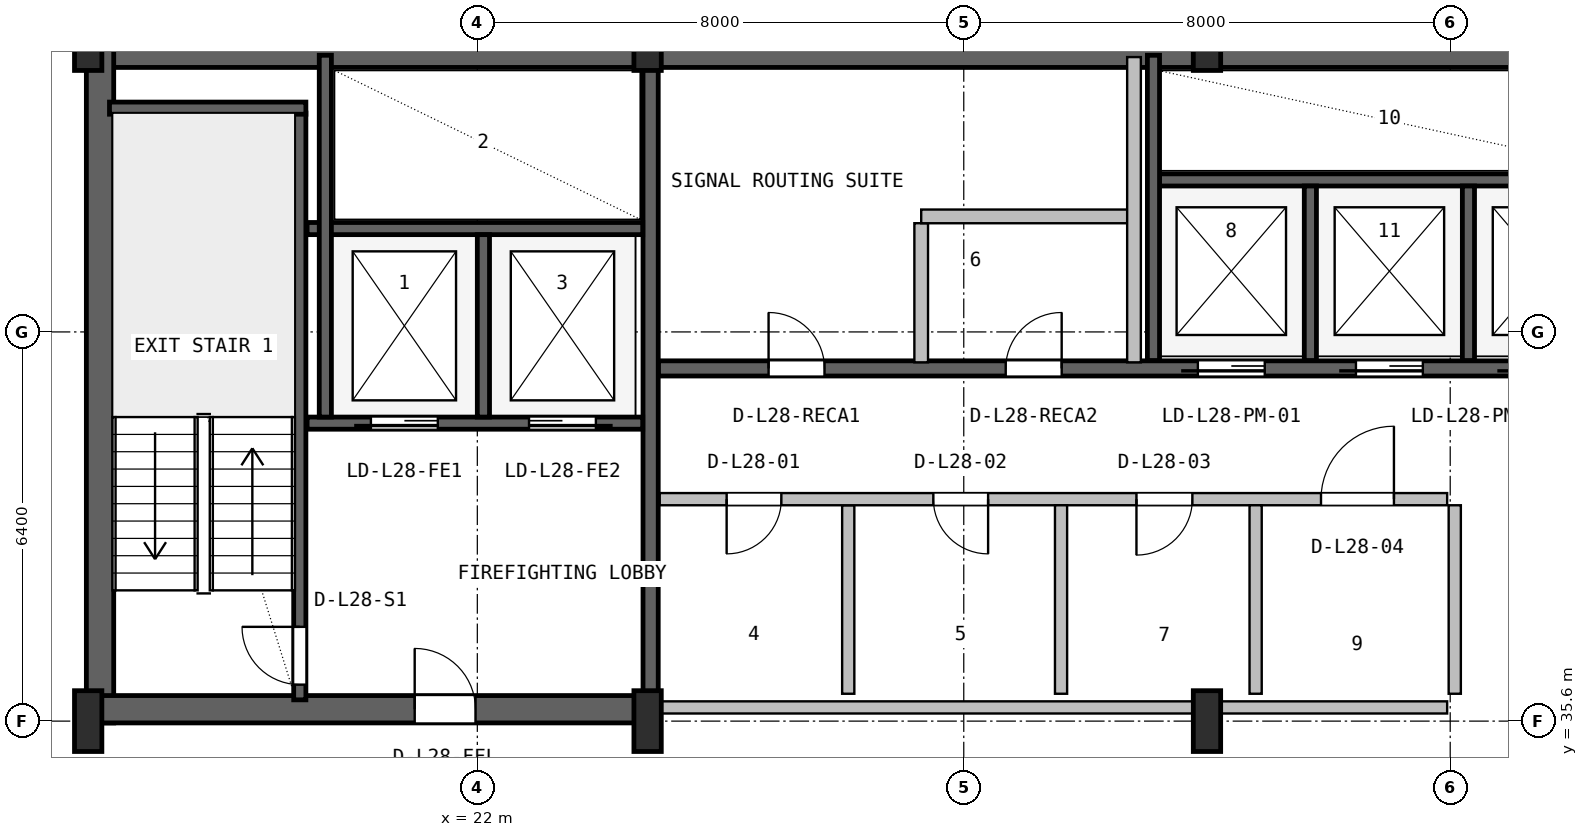
"""IFC4 building model, lengths in metres.
Left out: names, types, materials, properties, quantities, classifications, styles, units other than length and angle.
Written with IfcOpenShell. Run it as: python <this file> out.ifc"""

import sys

from ifc_helpers import new_model, si_unit, direction, frame, frame_2d, origin, origin_2d, place, context, subcontext, project, spatial, rectangle, i_section, extrude, source, transform, mapped, element, fill, save


model = new_model("IFC4")
c1 = context("Model", 3, precision=1e-05, world=origin(), true_north=direction((0.0, 1.0)))
c2 = subcontext(c1, "Body", "Model", "MODEL_VIEW")
j1 = project(units=[si_unit("LENGTHUNIT", "METRE"), si_unit("PLANEANGLEUNIT", "RADIAN")], contexts=[c1])
p1 = place(None, origin())
s1 = spatial("IfcSite", under=j1, at=p1, CompositionType="ELEMENT")
p2 = place(p1, origin())
s2 = spatial("IfcBuilding", under=s1, at=p2, CompositionType="ELEMENT")
p3 = place(p2, frame((0.0, 0.0, 118.2)))
s3 = spatial("IfcBuildingStorey", under=s2, at=p3, CompositionType="ELEMENT", Elevation=118.2)
p4 = place(p3, frame((15.6, 46.575, 0.0), z_axis=(0.0, 0.0, 1.0), x_axis=(1.0, 0.0, 0.0)))
e1 = element("IfcWall", 1, at=p4, inside=s3, PredefinedType="SHEAR", context=c2, shape_type="SweptSolid", body=[
    extrude(rectangle(XDim=36.8, YDim=0.45, at=frame_2d((18.4, 0.0))), origin(), (0.0, 0.0, 1.0), 3.55),
])
p5 = place(p3, frame((15.795, 35.57, 0.0), z_axis=(0.0, 0.0, 1.0), x_axis=(0.0, 1.0, 0.0)))
e2 = element("IfcWall", 2, at=p5, inside=s3, PredefinedType="SHEAR", context=c2, shape_type="SweptSolid", body=[
    extrude(rectangle(XDim=11.23, YDim=0.45, at=frame_2d((5.615, 0.0))), origin(), (0.0, 0.0, 1.0), 3.55),
])
p6 = place(p3, frame((15.57, 35.795, 0.0), z_axis=(0.0, 0.0, 1.0), x_axis=(1.0, 0.0, 0.0)))
e3 = element("IfcWall", 3, at=p6, inside=s3, PredefinedType="SHEAR", context=c2, shape_type="SweptSolid", body=[
    extrude(rectangle(XDim=9.23, YDim=0.45, at=frame_2d((4.615, 0.0))), origin(), (0.0, 0.0, 1.0), 3.55),
])
p7 = place(p6, frame((5.4, 0.0, 0.0)))
e4 = element("IfcOpeningElement", 4, at=p7, cuts=e3, PredefinedType="OPENING", context=c2, shape_type="SweptSolid", body=[
    extrude(rectangle(XDim=1.0, YDim=2.1, at=frame_2d((0.5, 1.05))), frame((0.0, 0.235, 0.0), z_axis=(0.0, -1.0, 0.0), x_axis=(1.0, 0.0, 0.0)), (0.0, 0.0, 1.0), 0.47),
])
m1 = source(origin(), c2, "Body", "SweptSolid", [
    extrude(i_section(OverallWidth=0.45, OverallDepth=1.0, WebThickness=0.016, FlangeThickness=0.03, FilletRadius=0.016, at=origin_2d()), origin(), (0.0, 0.0, 1.0), 3.8),
])
for number, where, z_axis, x_axis in (
    (5, (15.6, 35.6, 0.0), (0.0, 0.0, 1.0), (1.0, 0.0, 0.0)),
    (6, (15.6, 46.8, 0.0), (0.0, 0.0, 1.0), (1.0, 0.0, 0.0)),
    (7, (24.8, 35.6, 0.0), (0.0, 0.0, 1.0), (1.0, 0.0, 0.0)),
    (8, (24.8, 46.8, 0.0), (0.0, 0.0, 1.0), (1.0, 0.0, 0.0)),
    (9, (34.0, 35.6, 0.0), (0.0, 0.0, 1.0), (1.0, 0.0, 0.0)),
    (10, (34.0, 46.8, 0.0), (0.0, 0.0, 1.0), (1.0, 0.0, 0.0)),
):
    element("IfcColumn", number, at=place(p3, frame(where, z_axis=z_axis, x_axis=x_axis)), inside=s3, PredefinedType="COLUMN", context=c2, shape_type="MappedRepresentation", body=[
        mapped(m1, transform((0.0, 0.0, 0.0), x_axis=(1.0, 0.0, 0.0), y_axis=(0.0, 1.0, 0.0), z_axis=(0.0, 0.0, 1.0), scale=1.0)),
    ])
p8 = place(p3, frame((19.08, 35.95, 0.0), z_axis=(0.0, 0.0, 1.0), x_axis=(0.0, 1.0, 0.0)))
e11 = element("IfcWall", 11, at=p8, inside=s3, PredefinedType="SHEAR", context=c2, shape_type="SweptSolid", body=[
    extrude(rectangle(XDim=9.65, YDim=0.2, at=frame_2d((4.825, 0.0))), origin(), (0.0, 0.0, 1.0), 3.55),
])
p9 = place(p8, frame((0.25, 0.0, 0.0)))
e12 = element("IfcOpeningElement", 12, at=p9, cuts=e11, PredefinedType="OPENING", context=c2, shape_type="SweptSolid", body=[
    extrude(rectangle(XDim=0.95, YDim=2.1, at=frame_2d((0.475, 1.05))), frame((0.0, 0.11, 0.0), z_axis=(0.0, -1.0, 0.0), x_axis=(1.0, 0.0, 0.0)), (0.0, 0.0, 1.0), 0.22),
])
p10 = place(p3, frame((15.95, 45.68, 0.0), z_axis=(0.0, 0.0, 1.0), x_axis=(1.0, 0.0, 0.0)))
e13 = element("IfcWall", 13, at=p10, inside=s3, PredefinedType="SHEAR", context=c2, shape_type="SweptSolid", body=[
    extrude(rectangle(XDim=3.23, YDim=0.2, at=frame_2d((1.615, 0.0))), origin(), (0.0, 0.0, 1.0), 3.55),
])
p11 = place(p3, frame((24.85, 36.05, 0.0), z_axis=(0.0, 0.0, 1.0), x_axis=(0.0, 1.0, 0.0)))
e14 = element("IfcWall", 14, at=p11, inside=s3, PredefinedType="SHEAR", context=c2, shape_type="SweptSolid", body=[
    extrude(rectangle(XDim=10.45, YDim=0.25, at=frame_2d((5.225, 0.0))), origin(), (0.0, 0.0, 1.0), 3.55),
])
p12 = place(p3, frame((19.2, 40.5, 0.0), z_axis=(0.0, 0.0, 1.0), x_axis=(1.0, 0.0, 0.0)))
e15 = element("IfcWall", 15, at=p12, inside=s3, PredefinedType="SHEAR", context=c2, shape_type="SweptSolid", body=[
    extrude(rectangle(XDim=5.52, YDim=0.2, at=frame_2d((2.76, 0.0))), origin(), (0.0, 0.0, 1.0), 3.55),
])
p13 = place(p12, frame((1.05, 0.0, 0.0)))
e16 = element("IfcOpeningElement", 16, at=p13, cuts=e15, PredefinedType="OPENING", context=c2, shape_type="SweptSolid", body=[
    extrude(rectangle(XDim=1.1, YDim=2.18, at=frame_2d((0.55, 1.09))), frame((0.0, 0.11, 0.0), z_axis=(0.0, -1.0, 0.0), x_axis=(1.0, 0.0, 0.0)), (0.0, 0.0, 1.0), 0.22),
])
p14 = place(p12, frame((3.65, 0.0, 0.0)))
e17 = element("IfcOpeningElement", 17, at=p14, cuts=e15, PredefinedType="OPENING", context=c2, shape_type="SweptSolid", body=[
    extrude(rectangle(XDim=1.1, YDim=2.18, at=frame_2d((0.55, 1.09))), frame((0.0, 0.11, 0.0), z_axis=(0.0, -1.0, 0.0), x_axis=(1.0, 0.0, 0.0)), (0.0, 0.0, 1.0), 0.22),
])
p15 = place(p3, frame((19.2, 43.7, 0.0), z_axis=(0.0, 0.0, 1.0), x_axis=(1.0, 0.0, 0.0)))
e18 = element("IfcWall", 18, at=p15, inside=s3, PredefinedType="SHEAR", context=c2, shape_type="SweptSolid", body=[
    extrude(rectangle(XDim=5.52, YDim=0.2, at=frame_2d((2.76, 0.0))), origin(), (0.0, 0.0, 1.0), 3.55),
])
p16 = place(p3, frame((22.1, 40.6, 0.0), z_axis=(0.0, 0.0, 1.0), x_axis=(0.0, 1.0, 0.0)))
e19 = element("IfcWall", 19, at=p16, inside=s3, PredefinedType="SHEAR", context=c2, shape_type="SweptSolid", body=[
    extrude(rectangle(XDim=3.0, YDim=0.2, at=frame_2d((1.5, 0.0))), origin(), (0.0, 0.0, 1.0), 3.55),
])
p17 = place(p3, frame((19.5, 40.6, 0.0), z_axis=(0.0, 0.0, 1.0), x_axis=(0.0, 1.0, 0.0)))
e20 = element("IfcWall", 20, at=p17, inside=s3, PredefinedType="SHEAR", context=c2, shape_type="SweptSolid", body=[
    extrude(rectangle(XDim=5.95, YDim=0.2, at=frame_2d((2.975, 0.0))), origin(), (0.0, 0.0, 1.0), 3.55),
])
p18 = place(p3, frame((24.98, 41.4, 0.0), z_axis=(0.0, 0.0, 1.0), x_axis=(1.0, 0.0, 0.0)))
e21 = element("IfcWall", 21, at=p18, inside=s3, PredefinedType="SHEAR", context=c2, shape_type="SweptSolid", body=[
    extrude(rectangle(XDim=23.82, YDim=0.25, at=frame_2d((11.91, 0.0))), origin(), (0.0, 0.0, 1.0), 3.55),
])
p19 = place(p18, frame((8.87, 0.0, 0.0)))
e22 = element("IfcOpeningElement", 22, at=p19, cuts=e21, PredefinedType="OPENING", context=c2, shape_type="SweptSolid", body=[
    extrude(rectangle(XDim=1.1, YDim=2.18, at=frame_2d((0.55, 1.09))), frame((0.0, 0.135, 0.0), z_axis=(0.0, -1.0, 0.0), x_axis=(1.0, 0.0, 0.0)), (0.0, 0.0, 1.0), 0.27),
])
p20 = place(p18, frame((11.47, 0.0, 0.0)))
e23 = element("IfcOpeningElement", 23, at=p20, cuts=e21, PredefinedType="OPENING", context=c2, shape_type="SweptSolid", body=[
    extrude(rectangle(XDim=1.1, YDim=2.18, at=frame_2d((0.55, 1.09))), frame((0.0, 0.135, 0.0), z_axis=(0.0, -1.0, 0.0), x_axis=(1.0, 0.0, 0.0)), (0.0, 0.0, 1.0), 0.27),
])
p21 = place(p18, frame((14.07, 0.0, 0.0)))
e24 = element("IfcOpeningElement", 24, at=p21, cuts=e21, PredefinedType="OPENING", context=c2, shape_type="SweptSolid", body=[
    extrude(rectangle(XDim=1.1, YDim=2.18, at=frame_2d((0.55, 1.09))), frame((0.0, 0.135, 0.0), z_axis=(0.0, -1.0, 0.0), x_axis=(1.0, 0.0, 0.0)), (0.0, 0.0, 1.0), 0.27),
])
p22 = place(p18, frame((1.81, 0.0, 0.0)))
e25 = element("IfcOpeningElement", 25, at=p22, cuts=e21, PredefinedType="OPENING", context=c2, shape_type="SweptSolid", body=[
    extrude(rectangle(XDim=0.92, YDim=2.08, at=frame_2d((0.46, 1.04))), frame((0.0, 0.135, 0.0), z_axis=(0.0, -1.0, 0.0), x_axis=(1.0, 0.0, 0.0)), (0.0, 0.0, 1.0), 0.27),
])
p23 = place(p18, frame((5.71, 0.0, 0.0)))
e26 = element("IfcOpeningElement", 26, at=p23, cuts=e21, PredefinedType="OPENING", context=c2, shape_type="SweptSolid", body=[
    extrude(rectangle(XDim=0.92, YDim=2.08, at=frame_2d((0.46, 1.04))), frame((0.0, 0.135, 0.0), z_axis=(0.0, -1.0, 0.0), x_axis=(1.0, 0.0, 0.0)), (0.0, 0.0, 1.0), 0.27),
])
p24 = place(p3, frame((33.22, 44.5, 0.0), z_axis=(0.0, 0.0, 1.0), x_axis=(1.0, 0.0, 0.0)))
e27 = element("IfcWall", 27, at=p24, inside=s3, PredefinedType="SHEAR", context=c2, shape_type="SweptSolid", body=[
    extrude(rectangle(XDim=7.63, YDim=0.2, at=frame_2d((3.815, 0.0))), origin(), (0.0, 0.0, 1.0), 3.55),
])
p25 = place(p3, frame((33.12, 41.53, 0.0), z_axis=(0.0, 0.0, 1.0), x_axis=(0.0, 1.0, 0.0)))
e28 = element("IfcWall", 28, at=p25, inside=s3, PredefinedType="SHEAR", context=c2, shape_type="SweptSolid", body=[
    extrude(rectangle(XDim=5.02, YDim=0.2, at=frame_2d((2.51, 0.0))), origin(), (0.0, 0.0, 1.0), 3.55),
])
for number, where, z_axis, x_axis in (
    (29, (35.7, 41.53, 0.0), (0.0, 0.0, 1.0), (0.0, 1.0, 0.0)),
    (30, (38.3, 41.53, 0.0), (0.0, 0.0, 1.0), (0.0, 1.0, 0.0)),
):
    element("IfcWall", number, at=place(p3, frame(where, z_axis=z_axis, x_axis=x_axis)), inside=s3, PredefinedType="SHEAR", context=c2, shape_type="SweptSolid", body=[
        extrude(rectangle(XDim=2.87, YDim=0.2, at=frame_2d((1.435, 0.0))), origin(), (0.0, 0.0, 1.0), 3.55),
    ])
p26 = place(p3, frame((25.0, 35.825, 0.0), z_axis=(0.0, 0.0, 1.0), x_axis=(1.0, 0.0, 0.0)))
e31 = element("IfcWall", 31, at=p26, inside=s3, PredefinedType="SOLIDWALL", context=c2, shape_type="SweptSolid", body=[
    extrude(rectangle(XDim=12.95, YDim=0.2, at=frame_2d((6.475, 0.0))), origin(), (0.0, 0.0, 1.0), 2.325),
])
p27 = place(p3, frame((28.1, 36.05, 0.0), z_axis=(0.0, 0.0, 1.0), x_axis=(0.0, 1.0, 0.0)))
e32 = element("IfcWall", 32, at=p27, inside=s3, PredefinedType="PLUMBINGWALL", context=c2, shape_type="SweptSolid", body=[
    extrude(rectangle(XDim=3.1, YDim=0.2, at=frame_2d((1.55, 0.0))), origin(), (0.0, 0.0, 1.0), 3.53),
])
p28 = place(p3, frame((25.0, 39.25, 0.0), z_axis=(0.0, 0.0, 1.0), x_axis=(1.0, 0.0, 0.0)))
e33 = element("IfcWall", 33, at=p28, inside=s3, PredefinedType="SOLIDWALL", context=c2, shape_type="SweptSolid", body=[
    extrude(rectangle(XDim=12.95, YDim=0.2, at=frame_2d((6.475, 0.0))), origin(), (0.0, 0.0, 1.0), 3.53),
])
p29 = place(p28, frame((1.1, 0.0, 0.0)))
e34 = element("IfcOpeningElement", 34, at=p29, cuts=e33, PredefinedType="OPENING", context=c2, shape_type="SweptSolid", body=[
    extrude(rectangle(XDim=0.9, YDim=2.06, at=frame_2d((0.45, 1.03))), frame((0.0, 0.11, 0.0), z_axis=(0.0, -1.0, 0.0), x_axis=(1.0, 0.0, 0.0)), (0.0, 0.0, 1.0), 0.22),
])
p30 = place(p28, frame((4.5, 0.0, 0.0)))
e35 = element("IfcOpeningElement", 35, at=p30, cuts=e33, PredefinedType="OPENING", context=c2, shape_type="SweptSolid", body=[
    extrude(rectangle(XDim=0.9, YDim=2.06, at=frame_2d((0.45, 1.03))), frame((0.0, 0.11, 0.0), z_axis=(0.0, -1.0, 0.0), x_axis=(1.0, 0.0, 0.0)), (0.0, 0.0, 1.0), 0.22),
])
p31 = place(p28, frame((7.84, 0.0, 0.0)))
e36 = element("IfcOpeningElement", 36, at=p31, cuts=e33, PredefinedType="OPENING", context=c2, shape_type="SweptSolid", body=[
    extrude(rectangle(XDim=0.92, YDim=2.08, at=frame_2d((0.46, 1.04))), frame((0.0, 0.11, 0.0), z_axis=(0.0, -1.0, 0.0), x_axis=(1.0, 0.0, 0.0)), (0.0, 0.0, 1.0), 0.22),
])
p32 = place(p28, frame((10.875, 0.0, 0.0)))
e37 = element("IfcOpeningElement", 37, at=p32, cuts=e33, PredefinedType="OPENING", context=c2, shape_type="SweptSolid", body=[
    extrude(rectangle(XDim=1.2, YDim=2.1, at=frame_2d((0.6, 1.05))), frame((0.0, 0.11, 0.0), z_axis=(0.0, -1.0, 0.0), x_axis=(1.0, 0.0, 0.0)), (0.0, 0.0, 1.0), 0.22),
])
p33 = place(p3, frame((31.6, 36.05, 0.0), z_axis=(0.0, 0.0, 1.0), x_axis=(0.0, 1.0, 0.0)))
e38 = element("IfcWall", 38, at=p33, inside=s3, PredefinedType="PLUMBINGWALL", context=c2, shape_type="SweptSolid", body=[
    extrude(rectangle(XDim=3.1, YDim=0.2, at=frame_2d((1.55, 0.0))), origin(), (0.0, 0.0, 1.0), 3.53),
])
for number, where, z_axis, x_axis in (
    (39, (34.8, 36.05, 0.0), (0.0, 0.0, 1.0), (0.0, 1.0, 0.0)),
    (40, (38.075, 36.05, 0.0), (0.0, 0.0, 1.0), (0.0, 1.0, 0.0)),
):
    element("IfcWall", number, at=place(p3, frame(where, z_axis=z_axis, x_axis=x_axis)), inside=s3, PredefinedType="SOLIDWALL", context=c2, shape_type="SweptSolid", body=[
        extrude(rectangle(XDim=3.1, YDim=0.2, at=frame_2d((1.55, 0.0))), origin(), (0.0, 0.0, 1.0), 3.53),
    ])
p34 = place(p3, frame((29.3, 41.5, 0.0), z_axis=(0.0, 0.0, 1.0), x_axis=(0.0, 1.0, 0.0)))
e41 = element("IfcWall", 41, at=p34, inside=s3, PredefinedType="PARTITIONING", context=c2, shape_type="SweptSolid", body=[
    extrude(rectangle(XDim=2.288, YDim=0.225, at=frame_2d((1.144, 0.0))), origin(), (0.0, 0.0, 1.0), 3.53),
])
p35 = place(p3, frame((29.3, 43.9, 0.0), z_axis=(0.0, 0.0, 1.0), x_axis=(1.0, 0.0, 0.0)))
e42 = element("IfcWall", 42, at=p35, inside=s3, PredefinedType="PARTITIONING", context=c2, shape_type="SweptSolid", body=[
    extrude(rectangle(XDim=3.5, YDim=0.225, at=frame_2d((1.75, 0.0))), origin(), (0.0, 0.0, 1.0), 3.53),
])
p36 = place(p3, frame((32.8, 41.5, 0.0), z_axis=(0.0, 0.0, 1.0), x_axis=(0.0, 1.0, 0.0)))
e43 = element("IfcWall", 43, at=p36, inside=s3, PredefinedType="PARTITIONING", context=c2, shape_type="SweptSolid", body=[
    extrude(rectangle(XDim=5.02, YDim=0.225, at=frame_2d((2.51, 0.0))), origin(), (0.0, 0.0, 1.0), 3.53),
])
m2 = source(origin(), c2, "Body", "SweptSolid", [
    extrude(rectangle(XDim=0.95, YDim=2.1, at=frame_2d((0.475, 1.05))), frame((0.0, 0.025, 0.0), z_axis=(0.0, -1.0, 0.0), x_axis=(1.0, 0.0, 0.0)), (0.0, 0.0, 1.0), 0.05),
])
p37 = place(p9, origin())
e44 = element("IfcDoor", 44, at=p37, inside=s3, OperationType="SINGLE_SWING_RIGHT", PredefinedType="DOOR", context=c2, shape_type="MappedRepresentation", body=[
    mapped(m2, transform((0.0, 0.0, 0.0), x_axis=(1.0, 0.0, 0.0), y_axis=(0.0, 1.0, 0.0), z_axis=(0.0, 0.0, 1.0), scale=1.0)),
])
fill(e12, e44)
m3 = source(origin(), c2, "Body", "SweptSolid", [
    extrude(rectangle(XDim=1.0, YDim=2.1, at=frame_2d((0.5, 1.05))), frame((0.0, 0.025, 0.0), z_axis=(0.0, -1.0, 0.0), x_axis=(1.0, 0.0, 0.0)), (0.0, 0.0, 1.0), 0.05),
])
p38 = place(p7, origin())
e45 = element("IfcDoor", 45, at=p38, inside=s3, OperationType="SINGLE_SWING_LEFT", PredefinedType="DOOR", context=c2, shape_type="MappedRepresentation", body=[
    mapped(m3, transform((0.0, 0.0, 0.0), x_axis=(1.0, 0.0, 0.0), y_axis=(0.0, 1.0, 0.0), z_axis=(0.0, 0.0, 1.0), scale=1.0)),
])
fill(e4, e45)
m4 = source(origin(), c2, "Body", "SweptSolid", [
    extrude(rectangle(XDim=1.1, YDim=2.18, at=frame_2d((0.55, 1.09))), frame((0.0, 0.025, 0.0), z_axis=(0.0, -1.0, 0.0), x_axis=(1.0, 0.0, 0.0)), (0.0, 0.0, 1.0), 0.05),
])
p39 = place(p13, frame((1.1, 0.0, 0.0), z_axis=(0.0, 0.0, 1.0), x_axis=(-1.0, 0.0, 0.0)))
e46 = element("IfcDoor", 46, at=p39, inside=s3, OperationType="SLIDING_TO_LEFT", PredefinedType="DOOR", context=c2, shape_type="MappedRepresentation", body=[
    mapped(m4, transform((0.0, 0.0, 0.0), x_axis=(1.0, 0.0, 0.0), y_axis=(0.0, 1.0, 0.0), z_axis=(0.0, 0.0, 1.0), scale=1.0)),
])
fill(e16, e46)
p40 = place(p14, frame((1.1, 0.0, 0.0), z_axis=(0.0, 0.0, 1.0), x_axis=(-1.0, 0.0, 0.0)))
e47 = element("IfcDoor", 47, at=p40, inside=s3, OperationType="SLIDING_TO_RIGHT", PredefinedType="DOOR", context=c2, shape_type="MappedRepresentation", body=[
    mapped(m4, transform((0.0, 0.0, 0.0), x_axis=(1.0, 0.0, 0.0), y_axis=(0.0, 1.0, 0.0), z_axis=(0.0, 0.0, 1.0), scale=1.0)),
])
fill(e17, e47)
p41 = place(p19, frame((1.1, 0.0, 0.0), z_axis=(0.0, 0.0, 1.0), x_axis=(-1.0, 0.0, 0.0)))
e48 = element("IfcDoor", 48, at=p41, inside=s3, OperationType="SLIDING_TO_LEFT", PredefinedType="DOOR", context=c2, shape_type="MappedRepresentation", body=[
    mapped(m4, transform((0.0, 0.0, 0.0), x_axis=(1.0, 0.0, 0.0), y_axis=(0.0, 1.0, 0.0), z_axis=(0.0, 0.0, 1.0), scale=1.0)),
])
fill(e22, e48)
p42 = place(p20, frame((1.1, 0.0, 0.0), z_axis=(0.0, 0.0, 1.0), x_axis=(-1.0, 0.0, 0.0)))
e49 = element("IfcDoor", 49, at=p42, inside=s3, OperationType="SLIDING_TO_LEFT", PredefinedType="DOOR", context=c2, shape_type="MappedRepresentation", body=[
    mapped(m4, transform((0.0, 0.0, 0.0), x_axis=(1.0, 0.0, 0.0), y_axis=(0.0, 1.0, 0.0), z_axis=(0.0, 0.0, 1.0), scale=1.0)),
])
fill(e23, e49)
m5 = source(origin(), c2, "Body", "SweptSolid", [
    extrude(rectangle(XDim=0.92, YDim=2.08, at=frame_2d((0.46, 1.04))), frame((0.0, 0.025, 0.0), z_axis=(0.0, -1.0, 0.0), x_axis=(1.0, 0.0, 0.0)), (0.0, 0.0, 1.0), 0.05),
])
p43 = place(p22, origin())
e50 = element("IfcDoor", 50, at=p43, inside=s3, OperationType="SINGLE_SWING_LEFT", PredefinedType="DOOR", context=c2, shape_type="MappedRepresentation", body=[
    mapped(m5, transform((0.0, 0.0, 0.0), x_axis=(1.0, 0.0, 0.0), y_axis=(0.0, 1.0, 0.0), z_axis=(0.0, 0.0, 1.0), scale=1.0)),
])
fill(e25, e50)
p44 = place(p23, origin())
e51 = element("IfcDoor", 51, at=p44, inside=s3, OperationType="SINGLE_SWING_RIGHT", PredefinedType="DOOR", context=c2, shape_type="MappedRepresentation", body=[
    mapped(m5, transform((0.0, 0.0, 0.0), x_axis=(1.0, 0.0, 0.0), y_axis=(0.0, 1.0, 0.0), z_axis=(0.0, 0.0, 1.0), scale=1.0)),
])
fill(e26, e51)
m6 = source(origin(), c2, "Body", "SweptSolid", [
    extrude(rectangle(XDim=0.9, YDim=2.06, at=frame_2d((0.45, 1.03))), frame((0.0, 0.025, 0.0), z_axis=(0.0, -1.0, 0.0), x_axis=(1.0, 0.0, 0.0)), (0.0, 0.0, 1.0), 0.05),
])
p45 = place(p29, frame((0.9, 0.0, 0.0), z_axis=(0.0, 0.0, 1.0), x_axis=(-1.0, 0.0, 0.0)))
e52 = element("IfcDoor", 52, at=p45, inside=s3, OperationType="SINGLE_SWING_LEFT", PredefinedType="DOOR", context=c2, shape_type="MappedRepresentation", body=[
    mapped(m6, transform((0.0, 0.0, 0.0), x_axis=(1.0, 0.0, 0.0), y_axis=(0.0, 1.0, 0.0), z_axis=(0.0, 0.0, 1.0), scale=1.0)),
])
fill(e34, e52)
p46 = place(p30, frame((0.9, 0.0, 0.0), z_axis=(0.0, 0.0, 1.0), x_axis=(-1.0, 0.0, 0.0)))
e53 = element("IfcDoor", 53, at=p46, inside=s3, OperationType="SINGLE_SWING_RIGHT", PredefinedType="DOOR", context=c2, shape_type="MappedRepresentation", body=[
    mapped(m6, transform((0.0, 0.0, 0.0), x_axis=(1.0, 0.0, 0.0), y_axis=(0.0, 1.0, 0.0), z_axis=(0.0, 0.0, 1.0), scale=1.0)),
])
fill(e35, e53)
p47 = place(p31, frame((0.92, 0.0, 0.0), z_axis=(0.0, 0.0, 1.0), x_axis=(-1.0, 0.0, 0.0)))
e54 = element("IfcDoor", 54, at=p47, inside=s3, OperationType="SINGLE_SWING_LEFT", PredefinedType="DOOR", context=c2, shape_type="MappedRepresentation", body=[
    mapped(m5, transform((0.0, 0.0, 0.0), x_axis=(1.0, 0.0, 0.0), y_axis=(0.0, 1.0, 0.0), z_axis=(0.0, 0.0, 1.0), scale=1.0)),
])
fill(e36, e54)
m7 = source(origin(), c2, "Body", "SweptSolid", [
    extrude(rectangle(XDim=1.2, YDim=2.1, at=frame_2d((0.6, 1.05))), frame((0.0, 0.025, 0.0), z_axis=(0.0, -1.0, 0.0), x_axis=(1.0, 0.0, 0.0)), (0.0, 0.0, 1.0), 0.05),
])
p48 = place(p32, origin())
e55 = element("IfcDoor", 55, at=p48, inside=s3, OperationType="SINGLE_SWING_RIGHT", PredefinedType="DOOR", context=c2, shape_type="MappedRepresentation", body=[
    mapped(m7, transform((0.0, 0.0, 0.0), x_axis=(1.0, 0.0, 0.0), y_axis=(0.0, 1.0, 0.0), z_axis=(0.0, 0.0, 1.0), scale=1.0)),
])
fill(e37, e55)
save(model, sys.argv[1])
